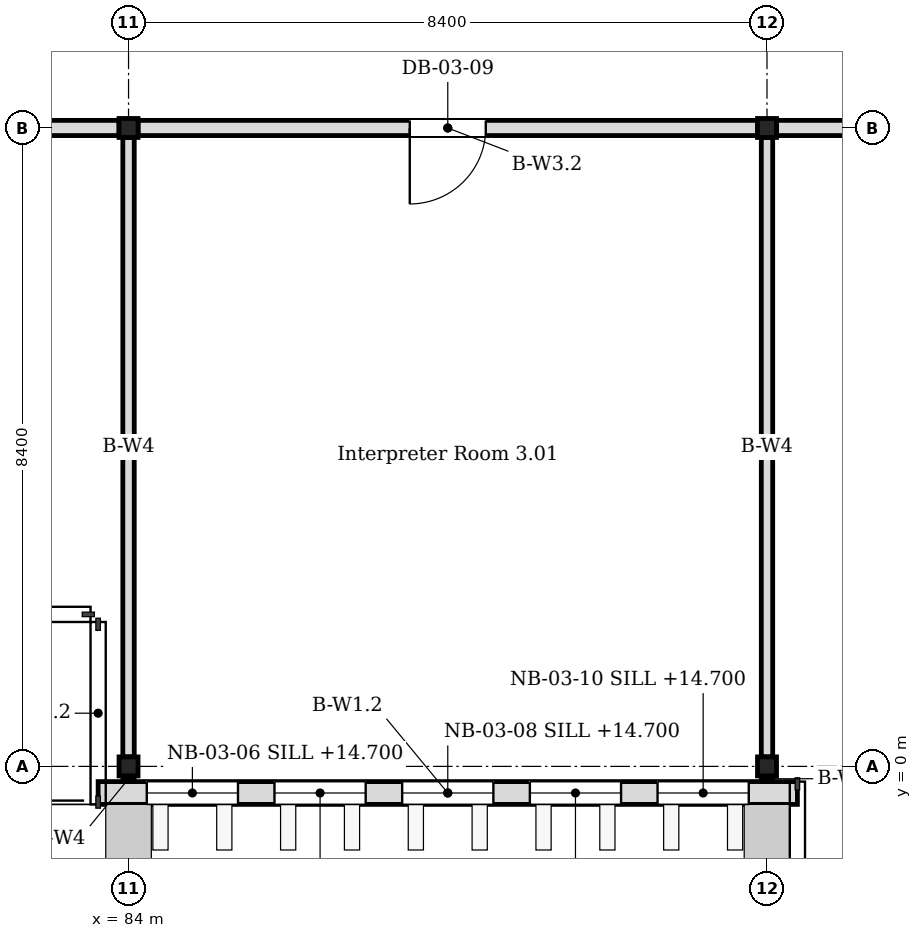
"""IFC4 building model, lengths in metres.
Left out: names, types, materials, properties, quantities, classifications, styles, units other than length and angle.
Written with IfcOpenShell. Run it as: python <this file> out.ifc"""

import sys

from ifc_helpers import new_model, si_unit, direction, frame, frame_2d, origin, origin_2d, place, context, subcontext, project, spatial, rectangle, i_section, extrude, element, fill, save


model = new_model("IFC4")
c1 = context("Model", 3, precision=1e-05, world=origin(), true_north=direction((0.0, 1.0)))
c2 = subcontext(c1, "Body", "Model", "MODEL_VIEW")
j1 = project(units=[si_unit("LENGTHUNIT", "METRE"), si_unit("PLANEANGLEUNIT", "RADIAN")], contexts=[c1])
p1 = place(None, origin())
s1 = spatial("IfcSite", under=j1, at=p1, CompositionType="ELEMENT")
p2 = place(p1, origin())
s2 = spatial("IfcBuilding", under=s1, at=p2, CompositionType="ELEMENT")
p3 = place(p2, frame((0.0, 0.0, 14.4)))
s3 = spatial("IfcBuildingStorey", under=s2, at=p3, CompositionType="ELEMENT", Elevation=14.4)
for number, where, z_axis, x_axis in (
    (1, (84.0, 0.0, 0.0), (0.0, 0.0, 1.0), (1.0, 0.0, 0.0)),
    (2, (84.0, 8.4, 0.0), (0.0, 0.0, 1.0), (1.0, 0.0, 0.0)),
    (3, (92.4, 0.0, 0.0), (0.0, 0.0, 1.0), (1.0, 0.0, 0.0)),
    (4, (92.4, 8.4, 0.0), (0.0, 0.0, 1.0), (1.0, 0.0, 0.0)),
):
    element("IfcColumn", number, at=place(p3, frame(where, z_axis=z_axis, x_axis=x_axis)), inside=s3, PredefinedType="COLUMN", context=c2, shape_type="SweptSolid", body=[
        extrude(i_section(OverallWidth=0.25, OverallDepth=0.25, WebThickness=0.009, FlangeThickness=0.014, FilletRadius=0.013, at=origin_2d()), origin(), (0.0, 0.0, 1.0), 3.95),
    ])
p4 = place(p3, frame((83.6, -0.35, 0.0), z_axis=(0.0, 0.0, 1.0), x_axis=(1.0, 0.0, 0.0)))
e5 = element("IfcWall", 5, at=p4, inside=s3, PredefinedType="SOLIDWALL", context=c2, shape_type="SweptSolid", body=[
    extrude(rectangle(XDim=9.2, YDim=0.3, at=frame_2d((4.6, 0.0))), origin(), (0.0, 0.0, 1.0), 3.95),
])
p5 = place(p4, frame((0.64, 0.0, 0.3)))
e6 = element("IfcOpeningElement", 6, at=p5, cuts=e5, PredefinedType="OPENING", context=c2, shape_type="SweptSolid", body=[
    extrude(rectangle(XDim=1.2, YDim=3.3, at=frame_2d((0.6, 1.65))), frame((0.0, 0.16, 0.0), z_axis=(0.0, -1.0, 0.0), x_axis=(1.0, 0.0, 0.0)), (0.0, 0.0, 1.0), 0.32),
])
p6 = place(p4, frame((2.32, 0.0, 0.3)))
e7 = element("IfcOpeningElement", 7, at=p6, cuts=e5, PredefinedType="OPENING", context=c2, shape_type="SweptSolid", body=[
    extrude(rectangle(XDim=1.2, YDim=3.3, at=frame_2d((0.6, 1.65))), frame((0.0, 0.16, 0.0), z_axis=(0.0, -1.0, 0.0), x_axis=(1.0, 0.0, 0.0)), (0.0, 0.0, 1.0), 0.32),
])
p7 = place(p4, frame((4.0, 0.0, 0.3)))
e8 = element("IfcOpeningElement", 8, at=p7, cuts=e5, PredefinedType="OPENING", context=c2, shape_type="SweptSolid", body=[
    extrude(rectangle(XDim=1.2, YDim=3.3, at=frame_2d((0.6, 1.65))), frame((0.0, 0.16, 0.0), z_axis=(0.0, -1.0, 0.0), x_axis=(1.0, 0.0, 0.0)), (0.0, 0.0, 1.0), 0.32),
])
p8 = place(p4, frame((5.68, 0.0, 0.3)))
e9 = element("IfcOpeningElement", 9, at=p8, cuts=e5, PredefinedType="OPENING", context=c2, shape_type="SweptSolid", body=[
    extrude(rectangle(XDim=1.2, YDim=3.3, at=frame_2d((0.6, 1.65))), frame((0.0, 0.16, 0.0), z_axis=(0.0, -1.0, 0.0), x_axis=(1.0, 0.0, 0.0)), (0.0, 0.0, 1.0), 0.32),
])
p9 = place(p4, frame((7.36, 0.0, 0.3)))
e10 = element("IfcOpeningElement", 10, at=p9, cuts=e5, PredefinedType="OPENING", context=c2, shape_type="SweptSolid", body=[
    extrude(rectangle(XDim=1.2, YDim=3.3, at=frame_2d((0.6, 1.65))), frame((0.0, 0.16, 0.0), z_axis=(0.0, -1.0, 0.0), x_axis=(1.0, 0.0, 0.0)), (0.0, 0.0, 1.0), 0.32),
])
p10 = place(p3, frame((75.725, 8.4, 0.0), z_axis=(0.0, 0.0, 1.0), x_axis=(1.0, 0.0, 0.0)))
e11 = element("IfcWall", 11, at=p10, inside=s3, PredefinedType="PARTITIONING", context=c2, shape_type="SweptSolid", body=[
    extrude(rectangle(XDim=8.15, YDim=0.2, at=frame_2d((4.075, 0.0))), origin(), (0.0, 0.0, 1.0), 3.25),
])
p11 = place(p10, frame((2.875, 0.0, 0.0)))
e12 = element("IfcOpeningElement", 12, at=p11, cuts=e11, PredefinedType="OPENING", context=c2, shape_type="SweptSolid", body=[
    extrude(rectangle(XDim=2.4, YDim=2.2, at=frame_2d((1.2, 1.1))), frame((0.0, 0.11, 0.0), z_axis=(0.0, -1.0, 0.0), x_axis=(1.0, 0.0, 0.0)), (0.0, 0.0, 1.0), 0.22),
])
p12 = place(p3, frame((84.125, 8.4, 0.0), z_axis=(0.0, 0.0, 1.0), x_axis=(1.0, 0.0, 0.0)))
e13 = element("IfcWall", 13, at=p12, inside=s3, PredefinedType="PARTITIONING", context=c2, shape_type="SweptSolid", body=[
    extrude(rectangle(XDim=8.15, YDim=0.2, at=frame_2d((4.075, 0.0))), origin(), (0.0, 0.0, 1.0), 3.25),
])
p13 = place(p12, frame((3.575, 0.0, 0.0)))
e14 = element("IfcOpeningElement", 14, at=p13, cuts=e13, PredefinedType="OPENING", context=c2, shape_type="SweptSolid", body=[
    extrude(rectangle(XDim=1.0, YDim=2.1, at=frame_2d((0.5, 1.05))), frame((0.0, 0.11, 0.0), z_axis=(0.0, -1.0, 0.0), x_axis=(1.0, 0.0, 0.0)), (0.0, 0.0, 1.0), 0.22),
])
p14 = place(p3, frame((92.525, 8.4, 0.0), z_axis=(0.0, 0.0, 1.0), x_axis=(1.0, 0.0, 0.0)))
e15 = element("IfcWall", 15, at=p14, inside=s3, PredefinedType="PARTITIONING", context=c2, shape_type="SweptSolid", body=[
    extrude(rectangle(XDim=8.15, YDim=0.2, at=frame_2d((4.075, 0.0))), origin(), (0.0, 0.0, 1.0), 3.25),
])
p15 = place(p14, frame((2.875, 0.0, 0.0)))
e16 = element("IfcOpeningElement", 16, at=p15, cuts=e15, PredefinedType="OPENING", context=c2, shape_type="SweptSolid", body=[
    extrude(rectangle(XDim=2.4, YDim=2.2, at=frame_2d((1.2, 1.1))), frame((0.0, 0.11, 0.0), z_axis=(0.0, -1.0, 0.0), x_axis=(1.0, 0.0, 0.0)), (0.0, 0.0, 1.0), 0.22),
])
p16 = place(p3, frame((84.0, -0.2, 0.0), z_axis=(0.0, 0.0, 1.0), x_axis=(0.0, 1.0, 0.0)))
e17 = element("IfcWall", 17, at=p16, inside=s3, PredefinedType="PARTITIONING", context=c2, shape_type="SweptSolid", body=[
    extrude(rectangle(XDim=0.075, YDim=0.15, at=frame_2d((0.038, 0.0))), origin(), (0.0, 0.0, 1.0), 3.25),
])
p17 = place(p3, frame((84.0, 0.125, 0.0), z_axis=(0.0, 0.0, 1.0), x_axis=(0.0, 1.0, 0.0)))
e18 = element("IfcWall", 18, at=p17, inside=s3, PredefinedType="PARTITIONING", context=c2, shape_type="SweptSolid", body=[
    extrude(rectangle(XDim=8.15, YDim=0.15, at=frame_2d((4.075, 0.0))), origin(), (0.0, 0.0, 1.0), 3.25),
])
p18 = place(p3, frame((92.4, -0.2, 0.0), z_axis=(0.0, 0.0, 1.0), x_axis=(0.0, 1.0, 0.0)))
e19 = element("IfcWall", 19, at=p18, inside=s3, PredefinedType="PARTITIONING", context=c2, shape_type="SweptSolid", body=[
    extrude(rectangle(XDim=0.075, YDim=0.15, at=frame_2d((0.038, 0.0))), origin(), (0.0, 0.0, 1.0), 3.25),
])
p19 = place(p3, frame((92.4, 0.125, 0.0), z_axis=(0.0, 0.0, 1.0), x_axis=(0.0, 1.0, 0.0)))
e20 = element("IfcWall", 20, at=p19, inside=s3, PredefinedType="PARTITIONING", context=c2, shape_type="SweptSolid", body=[
    extrude(rectangle(XDim=8.15, YDim=0.15, at=frame_2d((4.075, 0.0))), origin(), (0.0, 0.0, 1.0), 3.25),
])
p20 = place(p5, origin())
e21 = element("IfcWindow", 21, at=p20, inside=s3, PartitioningType="TRIPLE_PANEL_VERTICAL", PredefinedType="WINDOW", context=c2, shape_type="SweptSolid", body=[
    extrude(rectangle(XDim=1.2, YDim=3.3, at=frame_2d((0.6, 1.65))), frame((0.0, 0.03, 0.0), z_axis=(0.0, -1.0, 0.0), x_axis=(1.0, 0.0, 0.0)), (0.0, 0.0, 1.0), 0.06),
])
fill(e6, e21)
p21 = place(p6, origin())
e22 = element("IfcWindow", 22, at=p21, inside=s3, PartitioningType="TRIPLE_PANEL_VERTICAL", PredefinedType="WINDOW", context=c2, shape_type="SweptSolid", body=[
    extrude(rectangle(XDim=1.2, YDim=3.3, at=frame_2d((0.6, 1.65))), frame((0.0, 0.03, 0.0), z_axis=(0.0, -1.0, 0.0), x_axis=(1.0, 0.0, 0.0)), (0.0, 0.0, 1.0), 0.06),
])
fill(e7, e22)
p22 = place(p7, origin())
e23 = element("IfcWindow", 23, at=p22, inside=s3, PartitioningType="TRIPLE_PANEL_VERTICAL", PredefinedType="WINDOW", context=c2, shape_type="SweptSolid", body=[
    extrude(rectangle(XDim=1.2, YDim=3.3, at=frame_2d((0.6, 1.65))), frame((0.0, 0.03, 0.0), z_axis=(0.0, -1.0, 0.0), x_axis=(1.0, 0.0, 0.0)), (0.0, 0.0, 1.0), 0.06),
])
fill(e8, e23)
p23 = place(p8, origin())
e24 = element("IfcWindow", 24, at=p23, inside=s3, PartitioningType="TRIPLE_PANEL_VERTICAL", PredefinedType="WINDOW", context=c2, shape_type="SweptSolid", body=[
    extrude(rectangle(XDim=1.2, YDim=3.3, at=frame_2d((0.6, 1.65))), frame((0.0, 0.03, 0.0), z_axis=(0.0, -1.0, 0.0), x_axis=(1.0, 0.0, 0.0)), (0.0, 0.0, 1.0), 0.06),
])
fill(e9, e24)
p24 = place(p9, origin())
e25 = element("IfcWindow", 25, at=p24, inside=s3, PartitioningType="TRIPLE_PANEL_VERTICAL", PredefinedType="WINDOW", context=c2, shape_type="SweptSolid", body=[
    extrude(rectangle(XDim=1.2, YDim=3.3, at=frame_2d((0.6, 1.65))), frame((0.0, 0.03, 0.0), z_axis=(0.0, -1.0, 0.0), x_axis=(1.0, 0.0, 0.0)), (0.0, 0.0, 1.0), 0.06),
])
fill(e10, e25)
p25 = place(p13, origin())
e26 = element("IfcDoor", 26, at=p25, inside=s3, OperationType="SINGLE_SWING_LEFT", PredefinedType="DOOR", context=c2, shape_type="SweptSolid", body=[
    extrude(rectangle(XDim=1.0, YDim=2.1, at=frame_2d((0.5, 1.05))), frame((0.0, 0.025, 0.0), z_axis=(0.0, -1.0, 0.0), x_axis=(1.0, 0.0, 0.0)), (0.0, 0.0, 1.0), 0.05),
])
fill(e14, e26)
save(model, sys.argv[1])
